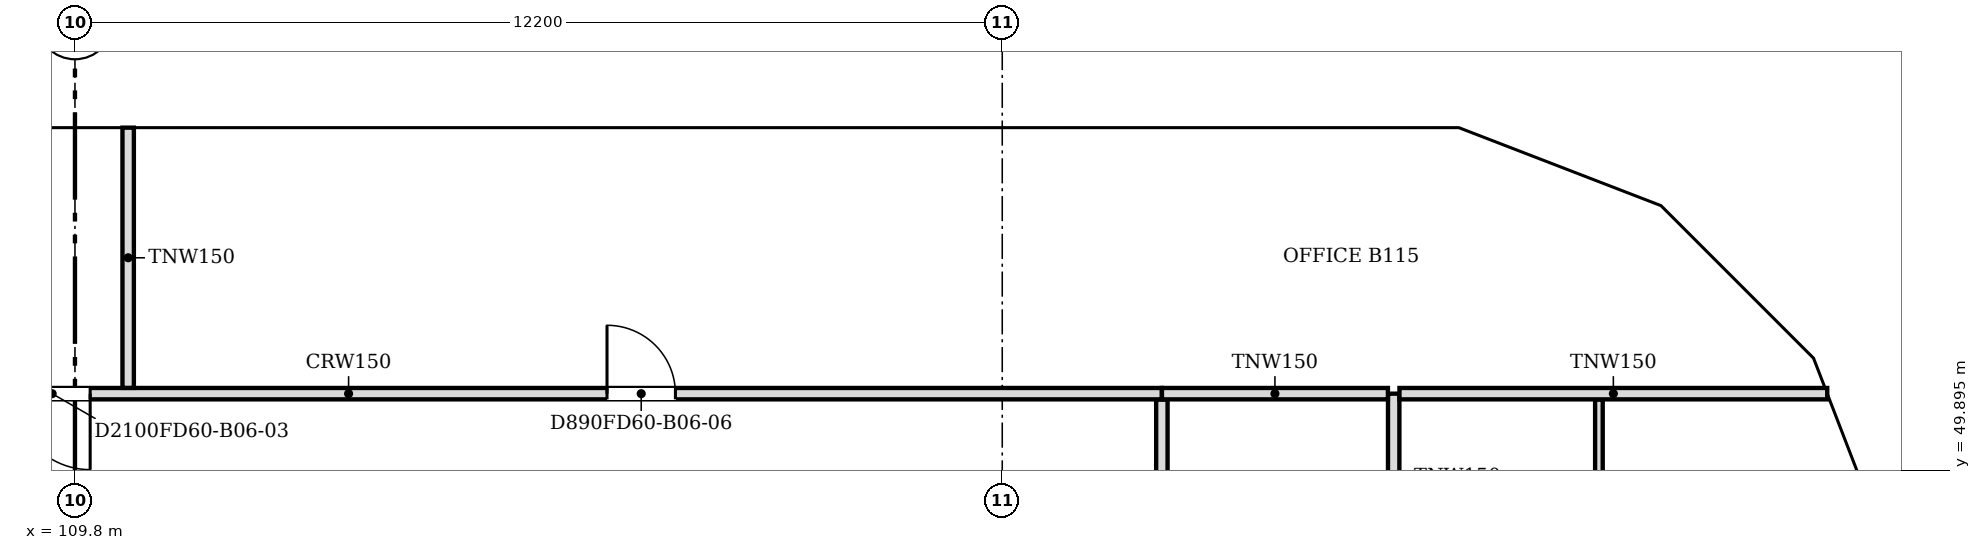
"""IFC4 building model, lengths in metres.
Left out: names, types, materials, properties, quantities, classifications, styles, units other than length and angle.
Written with IfcOpenShell. Run it as: python <this file> out.ifc"""

import sys

from ifc_helpers import new_model, si_unit, direction, frame, frame_2d, origin, place, context, subcontext, project, spatial, polyline, rectangle, outline, extrude, faceted_brep, source, transform, mapped, element, fill, save


model = new_model("IFC4")
c1 = context("Model", 3, precision=1e-05, world=origin(), true_north=direction((0.0, 1.0)))
c2 = subcontext(c1, "Body", "Model", "MODEL_VIEW")
j1 = project(units=[si_unit("LENGTHUNIT", "METRE"), si_unit("PLANEANGLEUNIT", "RADIAN")], contexts=[c1])
p1 = place(None, origin())
s1 = spatial("IfcSite", under=j1, at=p1, CompositionType="ELEMENT")
p2 = place(p1, origin())
s2 = spatial("IfcBuilding", under=s1, at=p2, CompositionType="ELEMENT")
p3 = place(p2, frame((0.0, 0.0, 60.0)))
s3 = spatial("IfcBuildingStorey", under=s2, at=p3, CompositionType="ELEMENT", Elevation=60.0)
m1 = source(origin(), c2, "Body", "Brep", [
    faceted_brep([(0.047, -0.25, 0.0), (2.997, -0.25, 3.8), (0.047, -0.25, 7.6), (0.0, -0.25, 7.541), (0.0, -0.25, 0.059), (0.093, 0.25, 7.54), (2.944, 0.25, 3.868), (2.944, 0.25, 3.732), (0.093, 0.25, 0.06), (2.997, 0.0, 3.8), (0.047, 0.0, 0.0), (0.047, 0.0, 7.6)], [[[0, 1, 2, 3, 4]], [[5, 6, 7, 8]], [[8, 7, 9, 1, 0, 10]], [[6, 5, 11, 2, 1, 9]], [[3, 2, 11]], [[10, 0, 4]], [[8, 10, 4, 3, 11, 5]], [[9, 7, 6]]]),
])
p4 = place(p3, frame((133.967, 48.71, -3.8), z_axis=(0.0, 0.0, 1.0), x_axis=(-0.359901446078, 0.932990326376, 0.0)))
e1 = element("IfcWall", 1, at=p4, inside=s3, PredefinedType="SOLIDWALL", context=c2, shape_type="MappedRepresentation", body=[
    mapped(m1, transform((0.0, 0.0, 0.0), scale=1.0)),
])
m2 = source(origin(), c2, "Body", "SweptSolid", [
    extrude(outline(polyline([(0.247, 0.665), (2.681, 3.8), (0.247, 6.935), (0.247, 0.665)])), frame((0.0, 0.26, 0.0), z_axis=(0.0, -1.0, 0.0), x_axis=(1.0, 0.0, 0.0)), (0.0, 0.0, 1.0), 0.52),
])
p5 = place(p4, origin())
e2 = element("IfcOpeningElement", 2, at=p5, cuts=e1, PredefinedType="OPENING", context=c2, shape_type="MappedRepresentation", body=[
    mapped(m2, transform((0.0, 0.0, 0.0), scale=1.0)),
])
m3 = source(origin(), c2, "Body", "Brep", [
    faceted_brep([(2.944, -0.25, 0.0), (2.997, -0.25, 0.068), (2.997, -0.25, 7.532), (2.944, -0.25, 7.6), (0.0, -0.25, 3.8), (0.053, 0.25, 3.868), (2.891, 0.25, 7.532), (2.891, 0.25, 0.068), (0.053, 0.25, 3.732), (2.944, 0.0, 0.0), (2.944, 0.0, 7.6), (0.0, 0.0, 3.8)], [[[0, 1, 2, 3, 4]], [[5, 6, 7, 8]], [[1, 0, 9]], [[10, 3, 2]], [[6, 5, 11, 4, 3, 10]], [[8, 7, 9, 0, 4, 11]], [[8, 11, 5]], [[1, 9, 7, 6, 10, 2]]]),
])
p6 = place(p3, frame((132.888, 51.506, -3.8), z_axis=(0.0, 0.0, 1.0), x_axis=(-0.707147509625, 0.707066050402, 0.0)))
e3 = element("IfcWall", 3, at=p6, inside=s3, PredefinedType="SOLIDWALL", context=c2, shape_type="MappedRepresentation", body=[
    mapped(m3, transform((0.0, 0.0, 0.0), scale=1.0)),
])
m4 = source(origin(), c2, "Body", "SweptSolid", [
    extrude(outline(polyline([(2.744, 6.934), (0.316, 3.8), (2.744, 0.666), (2.744, 6.934)])), frame((0.0, 0.26, 0.0), z_axis=(0.0, -1.0, 0.0), x_axis=(1.0, 0.0, 0.0)), (0.0, 0.0, 1.0), 0.52),
])
p7 = place(p6, origin())
e4 = element("IfcOpeningElement", 4, at=p7, cuts=e3, PredefinedType="OPENING", context=c2, shape_type="MappedRepresentation", body=[
    mapped(m4, transform((0.0, 0.0, 0.0), scale=1.0)),
])
m5 = source(origin(), c2, "Body", "Brep", [
    faceted_brep([(0.053, -0.25, 0.0), (3.003, -0.25, 3.8), (0.053, -0.25, 7.6), (0.0, -0.25, 7.532), (0.0, -0.25, 0.068), (0.106, 0.25, 7.532), (2.957, 0.25, 3.86), (2.957, 0.25, 3.74), (0.106, 0.25, 0.068), (3.003, 0.0, 3.8), (0.053, 0.0, 0.0), (0.053, 0.0, 7.6)], [[[0, 1, 2, 3, 4]], [[5, 6, 7, 8]], [[8, 7, 9, 1, 0, 10]], [[6, 5, 11, 2, 1, 9]], [[3, 2, 11]], [[10, 0, 4]], [[8, 10, 4, 3, 11, 5]], [[9, 7, 6]]]),
])
p8 = place(p3, frame((130.856, 53.569, -3.8), z_axis=(0.0, 0.0, 1.0), x_axis=(-0.933007896601, 0.359855894603, 0.0)))
e5 = element("IfcWall", 5, at=p8, inside=s3, PredefinedType="SOLIDWALL", context=c2, shape_type="MappedRepresentation", body=[
    mapped(m5, transform((0.0, 0.0, 0.0), scale=1.0)),
])
m6 = source(origin(), c2, "Body", "SweptSolid", [
    extrude(outline(polyline([(0.253, 0.665), (2.687, 3.8), (0.253, 6.935), (0.253, 0.665)])), frame((0.0, 0.26, 0.0), z_axis=(0.0, -1.0, 0.0), x_axis=(1.0, 0.0, 0.0)), (0.0, 0.0, 1.0), 0.52),
])
p9 = place(p8, origin())
e6 = element("IfcOpeningElement", 6, at=p9, cuts=e5, PredefinedType="OPENING", context=c2, shape_type="MappedRepresentation", body=[
    mapped(m6, transform((0.0, 0.0, 0.0), scale=1.0)),
])
m7 = source(origin(), c2, "Body", "Brep", [
    faceted_brep([(3.003, -0.25, 0.0), (6.053, -0.25, 3.8), (3.003, -0.25, 7.6), (0.0, -0.25, 3.8), (0.047, 0.25, 3.859), (3.003, 0.25, 7.6), (6.053, 0.25, 3.8), (3.003, 0.25, 0.0), (0.047, 0.25, 3.741), (0.0, 0.0, 3.8)], [[[0, 1, 2, 3]], [[4, 5, 6, 7, 8]], [[7, 6, 1, 0]], [[6, 5, 2, 1]], [[5, 4, 9, 3, 2]], [[8, 7, 0, 3, 9]], [[8, 9, 4]]]),
])
p10 = place(p3, frame((128.053, 54.65, -3.8), z_axis=(0.0, 0.0, 1.0), x_axis=(-1.0, 0.0, 0.0)))
e7 = element("IfcWall", 7, at=p10, inside=s3, PredefinedType="SOLIDWALL", context=c2, shape_type="MappedRepresentation", body=[
    mapped(m7, transform((0.0, 0.0, 0.0), scale=1.0)),
])
m8 = source(origin(), c2, "Body", "SweptSolid", [
    extrude(outline(polyline([(3.005, 0.401), (5.733, 3.8), (3.005, 7.199), (0.319, 3.8), (3.005, 0.401)])), frame((0.0, 0.26, 0.0), z_axis=(0.0, -1.0, 0.0), x_axis=(1.0, 0.0, 0.0)), (0.0, 0.0, 1.0), 0.52),
])
p11 = place(p10, origin())
e8 = element("IfcOpeningElement", 8, at=p11, cuts=e7, PredefinedType="OPENING", context=c2, shape_type="MappedRepresentation", body=[
    mapped(m8, transform((0.0, 0.0, 0.0), scale=1.0)),
])
m9 = source(origin(), c2, "Body", "SweptSolid", [
    extrude(outline(polyline([(3.05, 0.0), (6.1, 3.8), (3.05, 7.6), (0.0, 3.8), (3.05, 0.0)])), frame((0.0, 0.25, 0.0), z_axis=(0.0, -1.0, 0.0), x_axis=(1.0, 0.0, 0.0)), (0.0, 0.0, 1.0), 0.5),
])
p12 = place(p3, frame((122.0, 54.65, -3.8), z_axis=(0.0, 0.0, 1.0), x_axis=(-1.0, 0.0, 0.0)))
e9 = element("IfcWall", 9, at=p12, inside=s3, PredefinedType="SOLIDWALL", context=c2, shape_type="MappedRepresentation", body=[
    mapped(m9, transform((0.0, 0.0, 0.0), scale=1.0)),
])
m10 = source(origin(), c2, "Body", "SweptSolid", [
    extrude(outline(polyline([(3.05, 0.399), (5.78, 3.8), (3.05, 7.201), (0.321, 3.8), (3.05, 0.399)])), frame((0.0, 0.26, 0.0), z_axis=(0.0, -1.0, 0.0), x_axis=(1.0, 0.0, 0.0)), (0.0, 0.0, 1.0), 0.52),
])
p13 = place(p12, origin())
e10 = element("IfcOpeningElement", 10, at=p13, cuts=e9, PredefinedType="OPENING", context=c2, shape_type="MappedRepresentation", body=[
    mapped(m10, transform((0.0, 0.0, 0.0), scale=1.0)),
])
m11 = source(origin(), c2, "Body", "Brep", [
    faceted_brep([(3.05, -0.25, 0.0), (6.1, -0.25, 3.8), (6.1, -0.25, 3.8), (3.05, -0.25, 7.6), (0.0, -0.25, 3.8), (0.0, 0.25, 3.8), (3.05, 0.25, 7.6), (6.1, 0.25, 3.8), (6.1, 0.25, 3.8), (3.05, 0.25, 0.0)], [[[0, 1, 2, 3, 4]], [[5, 6, 7, 8, 9]], [[9, 8, 1, 0]], [[7, 6, 3, 2]], [[6, 5, 4, 3]], [[5, 9, 0, 4]], [[1, 8, 7, 2]]]),
])
p14 = place(p3, frame((115.9, 54.65, -3.8), z_axis=(0.0, 0.0, 1.0), x_axis=(-1.0, 0.0, 0.0)))
e11 = element("IfcWall", 11, at=p14, inside=s3, PredefinedType="SOLIDWALL", context=c2, shape_type="MappedRepresentation", body=[
    mapped(m11, transform((0.0, 0.0, 0.0), scale=1.0)),
])
p15 = place(p14, origin())
e12 = element("IfcOpeningElement", 12, at=p15, cuts=e11, PredefinedType="OPENING", context=c2, shape_type="MappedRepresentation", body=[
    mapped(m10, transform((0.0, 0.0, 0.0), scale=1.0)),
])
p16 = place(p3, frame((109.8, 54.65, -3.8), z_axis=(0.0, 0.0, 1.0), x_axis=(-1.0, 0.0, 0.0)))
e13 = element("IfcWall", 13, at=p16, inside=s3, PredefinedType="SOLIDWALL", context=c2, shape_type="MappedRepresentation", body=[
    mapped(m9, transform((0.0, 0.0, 0.0), scale=1.0)),
])
p17 = place(p16, origin())
e14 = element("IfcOpeningElement", 14, at=p17, cuts=e13, PredefinedType="OPENING", context=c2, shape_type="MappedRepresentation", body=[
    mapped(m10, transform((0.0, 0.0, 0.0), scale=1.0)),
])
m12 = source(origin(), c2, "Body", "Brep", [
    faceted_brep([(2.95, -0.25, 0.0), (3.003, -0.25, 0.068), (3.003, -0.25, 3.8), (0.0, -0.25, 3.8), (0.047, 0.25, 3.8), (2.898, 0.25, 3.8), (2.898, 0.25, 0.068), (0.047, 0.25, 3.74), (2.95, 0.0, 0.0), (0.0, 0.0, 3.8)], [[[0, 1, 2, 3]], [[4, 5, 6, 7]], [[1, 0, 8]], [[5, 4, 9, 3, 2]], [[7, 6, 8, 0, 3, 9]], [[7, 9, 4]], [[1, 8, 6, 5, 2]]]),
])
p18 = place(p3, frame((133.95, 48.753, 0.0), z_axis=(0.0, 0.0, 1.0), x_axis=(-0.359855894603, 0.933007896601, 0.0)))
e15 = element("IfcWall", 15, at=p18, inside=s3, PredefinedType="SOLIDWALL", context=c2, shape_type="MappedRepresentation", body=[
    mapped(m12, transform((0.0, 0.0, 0.0), scale=1.0)),
])
m13 = source(origin(), c2, "Body", "SweptSolid", [
    extrude(outline(polyline([(2.75, 3.55), (0.511, 3.55), (2.75, 0.665), (2.75, 3.55)])), frame((0.0, 0.26, 0.0), z_axis=(0.0, -1.0, 0.0), x_axis=(1.0, 0.0, 0.0)), (0.0, 0.0, 1.0), 0.52),
])
p19 = place(p18, origin())
e16 = element("IfcOpeningElement", 16, at=p19, cuts=e15, PredefinedType="OPENING", context=c2, shape_type="MappedRepresentation", body=[
    mapped(m13, transform((0.0, 0.0, 0.0), scale=1.0)),
])
m14 = source(origin(), c2, "Body", "Brep", [
    faceted_brep([(0.053, -0.25, 0.0), (2.997, -0.25, 3.8), (0.0, -0.25, 3.8), (0.0, -0.25, 0.068), (0.106, 0.25, 3.8), (2.944, 0.25, 3.8), (2.944, 0.25, 3.732), (0.106, 0.25, 0.068), (2.997, 0.0, 3.8), (0.053, 0.0, 0.0)], [[[0, 1, 2, 3]], [[4, 5, 6, 7]], [[7, 6, 8, 1, 0, 9]], [[5, 4, 2, 1, 8]], [[9, 0, 3]], [[7, 9, 3, 2, 4]], [[6, 5, 8]]]),
])
p20 = place(p3, frame((132.926, 51.469, 0.0), z_axis=(0.0, 0.0, 1.0), x_axis=(-0.707066050402, 0.707147509625, 0.0)))
e17 = element("IfcWall", 17, at=p20, inside=s3, PredefinedType="SOLIDWALL", context=c2, shape_type="MappedRepresentation", body=[
    mapped(m14, transform((0.0, 0.0, 0.0), scale=1.0)),
])
m15 = source(origin(), c2, "Body", "SweptSolid", [
    extrude(outline(polyline([(0.253, 0.666), (2.487, 3.55), (0.253, 3.55), (0.253, 0.666)])), frame((0.0, 0.26, 0.0), z_axis=(0.0, -1.0, 0.0), x_axis=(1.0, 0.0, 0.0)), (0.0, 0.0, 1.0), 0.52),
])
p21 = place(p20, origin())
e18 = element("IfcOpeningElement", 18, at=p21, cuts=e17, PredefinedType="OPENING", context=c2, shape_type="MappedRepresentation", body=[
    mapped(m15, transform((0.0, 0.0, 0.0), scale=1.0)),
])
m16 = source(origin(), c2, "Body", "Brep", [
    faceted_brep([(2.95, -0.25, 0.0), (2.997, -0.25, 0.059), (2.997, -0.25, 3.8), (0.0, -0.25, 3.8), (0.053, 0.25, 3.8), (2.904, 0.25, 3.8), (2.904, 0.25, 0.06), (0.053, 0.25, 3.732), (2.95, 0.0, 0.0), (0.0, 0.0, 3.8)], [[[0, 1, 2, 3]], [[4, 5, 6, 7]], [[1, 0, 8]], [[5, 4, 9, 3, 2]], [[7, 6, 8, 0, 3, 9]], [[7, 9, 4]], [[1, 8, 6, 5, 2]]]),
])
p22 = place(p3, frame((130.806, 53.588, 0.0), z_axis=(0.0, 0.0, 1.0), x_axis=(-0.932990326376, 0.359901446078, 0.0)))
e19 = element("IfcWall", 19, at=p22, inside=s3, PredefinedType="SOLIDWALL", context=c2, shape_type="MappedRepresentation", body=[
    mapped(m16, transform((0.0, 0.0, 0.0), scale=1.0)),
])
p23 = place(p22, origin())
e20 = element("IfcOpeningElement", 20, at=p23, cuts=e19, PredefinedType="OPENING", context=c2, shape_type="MappedRepresentation", body=[
    mapped(m13, transform((0.0, 0.0, 0.0), scale=1.0)),
])
m17 = source(origin(), c2, "Body", "Brep", [
    faceted_brep([(0.047, -0.25, 0.0), (3.05, -0.25, 3.8), (0.0, -0.25, 3.8), (0.0, -0.25, 0.06), (0.093, 0.25, 3.8), (3.05, 0.25, 3.8), (0.093, 0.25, 0.059), (0.047, 0.0, 0.0)], [[[0, 1, 2, 3]], [[4, 5, 6]], [[6, 5, 1, 0, 7]], [[5, 4, 2, 1]], [[7, 0, 3]], [[6, 7, 3, 2, 4]]]),
])
p24 = place(p3, frame((128.1, 54.65, 0.0), z_axis=(0.0, 0.0, 1.0), x_axis=(-1.0, 0.0, 0.0)))
e21 = element("IfcWall", 21, at=p24, inside=s3, PredefinedType="SOLIDWALL", context=c2, shape_type="MappedRepresentation", body=[
    mapped(m17, transform((0.0, 0.0, 0.0), scale=1.0)),
])
m18 = source(origin(), c2, "Body", "SweptSolid", [
    extrude(outline(polyline([(0.247, 0.656), (2.534, 3.55), (0.247, 3.55), (0.247, 0.656)])), frame((0.0, 0.26, 0.0), z_axis=(0.0, -1.0, 0.0), x_axis=(1.0, 0.0, 0.0)), (0.0, 0.0, 1.0), 0.52),
])
p25 = place(p24, origin())
e22 = element("IfcOpeningElement", 22, at=p25, cuts=e21, PredefinedType="OPENING", context=c2, shape_type="MappedRepresentation", body=[
    mapped(m18, transform((0.0, 0.0, 0.0), scale=1.0)),
])
m19 = source(origin(), c2, "Body", "SweptSolid", [
    extrude(outline(polyline([(3.05, 0.0), (6.1, 3.8), (0.0, 3.8), (3.05, 0.0)])), frame((0.0, 0.25, 0.0), z_axis=(0.0, -1.0, 0.0), x_axis=(1.0, 0.0, 0.0)), (0.0, 0.0, 1.0), 0.5),
])
p26 = place(p3, frame((125.05, 54.65, 0.0), z_axis=(0.0, 0.0, 1.0), x_axis=(-1.0, 0.0, 0.0)))
e23 = element("IfcWall", 23, at=p26, inside=s3, PredefinedType="SOLIDWALL", context=c2, shape_type="MappedRepresentation", body=[
    mapped(m19, transform((0.0, 0.0, 0.0), scale=1.0)),
])
m20 = source(origin(), c2, "Body", "SweptSolid", [
    extrude(outline(polyline([(3.05, 0.399), (5.579, 3.55), (0.521, 3.55), (3.05, 0.399)])), frame((0.0, 0.26, 0.0), z_axis=(0.0, -1.0, 0.0), x_axis=(1.0, 0.0, 0.0)), (0.0, 0.0, 1.0), 0.52),
])
p27 = place(p26, origin())
e24 = element("IfcOpeningElement", 24, at=p27, cuts=e23, PredefinedType="OPENING", context=c2, shape_type="MappedRepresentation", body=[
    mapped(m20, transform((0.0, 0.0, 0.0), scale=1.0)),
])
m21 = source(origin(), c2, "Body", "Brep", [
    faceted_brep([(3.05, -0.25, 0.0), (6.1, -0.25, 3.8), (6.1, -0.25, 3.8), (0.0, -0.25, 3.8), (0.0, 0.25, 3.8), (6.1, 0.25, 3.8), (6.1, 0.25, 3.8), (3.05, 0.25, 0.0)], [[[0, 1, 2, 3]], [[4, 5, 6, 7]], [[7, 6, 1, 0]], [[5, 4, 3, 2]], [[4, 7, 0, 3]], [[1, 6, 5, 2]]]),
])
p28 = place(p3, frame((118.95, 54.65, 0.0), z_axis=(0.0, 0.0, 1.0), x_axis=(-1.0, 0.0, 0.0)))
e25 = element("IfcWall", 25, at=p28, inside=s3, PredefinedType="SOLIDWALL", context=c2, shape_type="MappedRepresentation", body=[
    mapped(m21, transform((0.0, 0.0, 0.0), scale=1.0)),
])
p29 = place(p28, origin())
e26 = element("IfcOpeningElement", 26, at=p29, cuts=e25, PredefinedType="OPENING", context=c2, shape_type="MappedRepresentation", body=[
    mapped(m20, transform((0.0, 0.0, 0.0), scale=1.0)),
])
p30 = place(p3, frame((112.85, 54.65, 0.0), z_axis=(0.0, 0.0, 1.0), x_axis=(-1.0, 0.0, 0.0)))
e27 = element("IfcWall", 27, at=p30, inside=s3, PredefinedType="SOLIDWALL", context=c2, shape_type="MappedRepresentation", body=[
    mapped(m19, transform((0.0, 0.0, 0.0), scale=1.0)),
])
p31 = place(p30, origin())
e28 = element("IfcOpeningElement", 28, at=p31, cuts=e27, PredefinedType="OPENING", context=c2, shape_type="MappedRepresentation", body=[
    mapped(m20, transform((0.0, 0.0, 0.0), scale=1.0)),
])
p32 = place(p3, frame((124.1, 50.824, 0.0), z_axis=(0.0, 0.0, 1.0), x_axis=(0.0, -1.0, 0.0)))
e29 = element("IfcWall", 29, at=p32, inside=s3, PredefinedType="PARTITIONING", context=c2, shape_type="SweptSolid", body=[
    extrude(rectangle(XDim=14.224, YDim=0.15, at=frame_2d((7.112, 0.0))), origin(), (0.0, 0.0, 1.0), 2.888),
])
m22 = source(origin(), c2, "Body", "SweptSolid", [
    extrude(rectangle(XDim=1.0, YDim=2.1, at=frame_2d((0.5, 1.05))), frame((0.0, 0.085, 0.0), z_axis=(0.0, -1.0, 0.0), x_axis=(1.0, 0.0, 0.0)), (0.0, 0.0, 1.0), 0.17),
])
p33 = place(p32, frame((2.123, 0.0, 0.0)))
e30 = element("IfcOpeningElement", 30, at=p33, cuts=e29, PredefinedType="OPENING", context=c2, shape_type="MappedRepresentation", body=[
    mapped(m22, transform((0.0, 0.0, 0.0), scale=1.0)),
])
p34 = place(p32, frame((9.224, 0.0, 0.0)))
e31 = element("IfcOpeningElement", 31, at=p34, cuts=e29, PredefinedType="OPENING", context=c2, shape_type="MappedRepresentation", body=[
    mapped(m22, transform((0.0, 0.0, 0.0), scale=1.0)),
])
p35 = place(p3, frame((127.15, 50.9, 0.0), z_axis=(0.0, 0.0, 1.0), x_axis=(0.0, -1.0, 0.0)))
e32 = element("IfcWall", 32, at=p35, inside=s3, PredefinedType="PARTITIONING", context=c2, shape_type="SweptSolid", body=[
    extrude(rectangle(XDim=5.3, YDim=0.15, at=frame_2d((2.65, 0.0))), origin(), (0.0, 0.0, 1.0), 2.888),
])
m23 = source(origin(), c2, "Body", "SweptSolid", [
    extrude(rectangle(XDim=0.9, YDim=2.1, at=frame_2d((0.45, 1.05))), frame((0.0, 0.085, 0.0), z_axis=(0.0, -1.0, 0.0), x_axis=(1.0, 0.0, 0.0)), (0.0, 0.0, 1.0), 0.17),
])
p36 = place(p35, frame((2.2, 0.0, 0.0)))
e33 = element("IfcOpeningElement", 33, at=p36, cuts=e32, PredefinedType="OPENING", context=c2, shape_type="MappedRepresentation", body=[
    mapped(m23, transform((0.0, 0.0, 0.0), scale=1.0)),
])
p37 = place(p3, frame((129.85, 50.824, 0.0), z_axis=(0.0, 0.0, 1.0), x_axis=(0.0, -1.0, 0.0)))
e34 = element("IfcWall", 34, at=p37, inside=s3, PredefinedType="PARTITIONING", context=c2, shape_type="SweptSolid", body=[
    extrude(rectangle(XDim=5.223, YDim=0.1, at=frame_2d((2.611, 0.0))), origin(), (0.0, 0.0, 1.0), 2.888),
])
m24 = source(origin(), c2, "Body", "SweptSolid", [
    extrude(rectangle(XDim=0.9, YDim=2.1, at=frame_2d((0.45, 1.05))), frame((0.0, 0.06, 0.0), z_axis=(0.0, -1.0, 0.0), x_axis=(1.0, 0.0, 0.0)), (0.0, 0.0, 1.0), 0.12),
])
p38 = place(p37, frame((2.123, 0.0, 0.0)))
e35 = element("IfcOpeningElement", 35, at=p38, cuts=e34, PredefinedType="OPENING", context=c2, shape_type="MappedRepresentation", body=[
    mapped(m24, transform((0.0, 0.0, 0.0), scale=1.0)),
])
p39 = place(p3, frame((108.5, 50.9, 0.0), z_axis=(0.0, 0.0, 1.0), x_axis=(1.0, 0.0, 0.0)))
e36 = element("IfcWall", 36, at=p39, inside=s3, PredefinedType="PARTITIONING", context=c2, shape_type="SweptSolid", body=[
    extrude(rectangle(XDim=15.6, YDim=0.15, at=frame_2d((7.8, 0.0))), origin(), (0.0, 0.0, 1.0), 2.888),
])
p40 = place(p39, frame((0.5, 0.0, 0.0)))
e37 = element("IfcOpeningElement", 37, at=p40, cuts=e36, PredefinedType="OPENING", context=c2, shape_type="MappedRepresentation", body=[
    mapped(m22, transform((0.0, 0.0, 0.0), scale=1.0)),
])
p41 = place(p39, frame((8.3, 0.0, 0.0)))
e38 = element("IfcOpeningElement", 38, at=p41, cuts=e36, PredefinedType="OPENING", context=c2, shape_type="MappedRepresentation", body=[
    mapped(m23, transform((0.0, 0.0, 0.0), scale=1.0)),
])
p42 = place(p3, frame((124.101, 50.9, 0.0), z_axis=(0.0, 0.0, 1.0), x_axis=(1.0, 0.0, 0.0)))
e39 = element("IfcWall", 39, at=p42, inside=s3, PredefinedType="PARTITIONING", context=c2, shape_type="SweptSolid", body=[
    extrude(rectangle(XDim=2.973, YDim=0.15, at=frame_2d((1.486, 0.0))), origin(), (0.0, 0.0, 1.0), 2.888),
])
p43 = place(p3, frame((127.226, 50.9, 0.0), z_axis=(0.0, 0.0, 1.0), x_axis=(1.0, 0.0, 0.0)))
e40 = element("IfcWall", 40, at=p43, inside=s3, PredefinedType="PARTITIONING", context=c2, shape_type="SweptSolid", body=[
    extrude(rectangle(XDim=5.628, YDim=0.15, at=frame_2d((2.814, 0.0))), origin(), (0.0, 0.0, 1.0), 2.888),
])
p44 = place(p3, frame((110.5, 50.976, 0.0), z_axis=(0.0, 0.0, 1.0), x_axis=(0.0, 1.0, 0.0)))
e41 = element("IfcWall", 41, at=p44, inside=s3, PredefinedType="PARTITIONING", context=c2, shape_type="SweptSolid", body=[
    extrude(rectangle(XDim=3.424, YDim=0.15, at=frame_2d((1.712, 0.0))), origin(), (0.0, 0.0, 1.0), 2.888),
])
m25 = source(origin(), c2, "Body", "SweptSolid", [
    extrude(rectangle(XDim=1.0, YDim=2.1, at=frame_2d((0.5, 1.05))), frame((0.0, 0.025, 0.0), z_axis=(0.0, -1.0, 0.0), x_axis=(1.0, 0.0, 0.0)), (0.0, 0.0, 1.0), 0.05),
])
p45 = place(p40, origin())
e42 = element("IfcDoor", 42, at=p45, inside=s3, OperationType="SINGLE_SWING_RIGHT", PredefinedType="DOOR", context=c2, shape_type="MappedRepresentation", body=[
    mapped(m25, transform((0.0, 0.0, 0.0), scale=1.0)),
])
fill(e37, e42)
m26 = source(origin(), c2, "Body", "SweptSolid", [
    extrude(rectangle(XDim=0.9, YDim=2.1, at=frame_2d((0.45, 1.05))), frame((0.0, 0.025, 0.0), z_axis=(0.0, -1.0, 0.0), x_axis=(1.0, 0.0, 0.0)), (0.0, 0.0, 1.0), 0.05),
])
p46 = place(p41, origin())
e43 = element("IfcDoor", 43, at=p46, inside=s3, OperationType="SINGLE_SWING_LEFT", PredefinedType="DOOR", context=c2, shape_type="MappedRepresentation", body=[
    mapped(m26, transform((0.0, 0.0, 0.0), scale=1.0)),
])
fill(e38, e43)
save(model, sys.argv[1])
